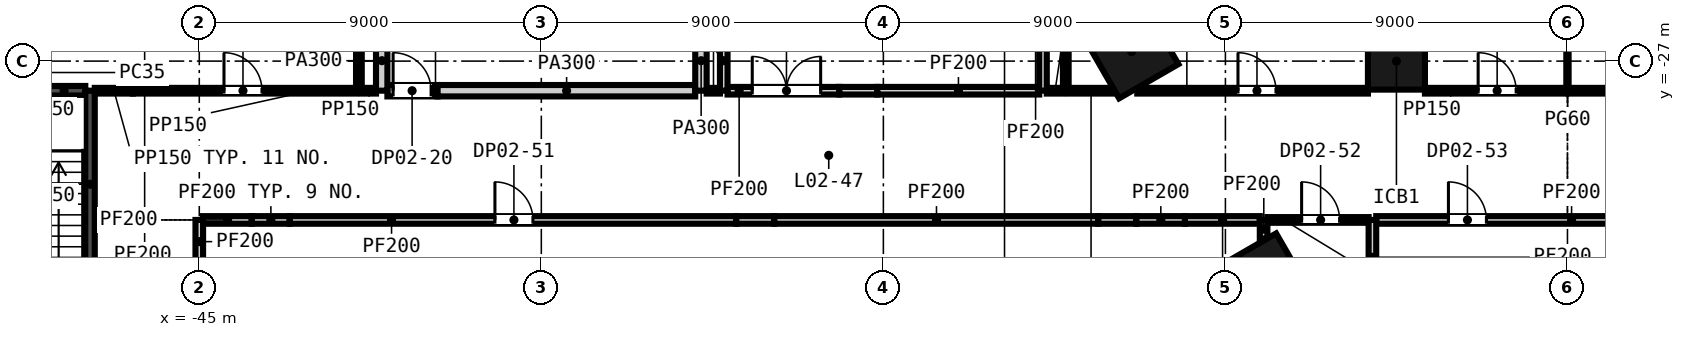
"""IFC4 building model, lengths in metres.
Left out: names, types, materials, properties, quantities, classifications, styles, units other than length and angle.
Written with IfcOpenShell. Run it as: python <this file> out.ifc"""

import sys

from ifc_helpers import new_model, si_unit, direction, frame, frame_2d, origin, origin_2d, place, context, subcontext, project, spatial, rectangle, extrude, element, fill, save


model = new_model("IFC4")
c1 = context("Model", 3, precision=1e-05, world=origin(), true_north=direction((0.0, 1.0)))
c2 = subcontext(c1, "Body", "Model", "MODEL_VIEW")
j1 = project(units=[si_unit("LENGTHUNIT", "METRE"), si_unit("PLANEANGLEUNIT", "RADIAN")], contexts=[c1])
p1 = place(None, origin())
s1 = spatial("IfcSite", under=j1, at=p1, CompositionType="ELEMENT")
p2 = place(p1, origin())
s2 = spatial("IfcBuilding", under=s1, at=p2, CompositionType="ELEMENT")
p3 = place(p2, frame((0.0, 0.0, 18.0)))
s3 = spatial("IfcBuildingStorey", under=s2, at=p3, CompositionType="ELEMENT", Elevation=18.0)
for number, where, z_axis, x_axis in (
    (1, (-20.467, -26.75, -0.4), (0.0, 0.0, 1.0), (0.5, -0.866, 0.0)),
    (2, (-16.995, -32.763, -0.4), (0.0, 0.0, 1.0), (0.5, -0.866, 0.0)),
):
    element("IfcColumn", number, at=place(p3, frame(where, z_axis=z_axis, x_axis=x_axis)), inside=s3, PredefinedType="COLUMN", context=c2, shape_type="SweptSolid", body=[
        extrude(rectangle(XDim=1.8, YDim=1.8, at=origin_2d()), origin(), (0.0, 0.0, 1.0), 4.6),
    ])
p4 = place(p3, frame((-13.5, -27.0, -0.4), z_axis=(0.0, 0.0, 1.0), x_axis=(1.0, 0.0, 0.0)))
e3 = element("IfcColumn", 3, at=p4, inside=s3, PredefinedType="COLUMN", context=c2, shape_type="SweptSolid", body=[
    extrude(rectangle(XDim=1.5, YDim=1.5, at=origin_2d()), origin(), (0.0, 0.0, 1.0), 4.6),
])
p5 = place(p3, frame((-44.9, -31.179, 0.0), z_axis=(0.0, 0.0, 1.0), x_axis=(1.0, 0.0, 0.0)))
e4 = element("IfcWall", 4, at=p5, inside=s3, PredefinedType="PARTITIONING", context=c2, shape_type="SweptSolid", body=[
    extrude(rectangle(XDim=1.279, YDim=0.2, at=frame_2d((0.64, 0.0))), origin(), (0.0, 0.0, 1.0), 4.2),
])
p6 = place(p3, frame((-43.621, -31.179, 0.0), z_axis=(0.0, 0.0, 1.0), x_axis=(1.0, 0.0, 0.0)))
e5 = element("IfcWall", 5, at=p6, inside=s3, PredefinedType="PARTITIONING", context=c2, shape_type="SweptSolid", body=[
    extrude(rectangle(XDim=1.0, YDim=0.2, at=frame_2d((0.5, 0.0))), origin(), (0.0, 0.0, 1.0), 3.219),
])
p7 = place(p3, frame((-42.621, -31.179, 0.0), z_axis=(0.0, 0.0, 1.0), x_axis=(1.0, 0.0, 0.0)))
e6 = element("IfcWall", 6, at=p7, inside=s3, PredefinedType="PARTITIONING", context=c2, shape_type="SweptSolid", body=[
    extrude(rectangle(XDim=11.75, YDim=0.2, at=frame_2d((5.875, 0.0))), origin(), (0.0, 0.0, 1.0), 4.2),
])
p8 = place(p7, frame((5.4, 0.0, 0.0)))
e7 = element("IfcOpeningElement", 7, at=p8, cuts=e6, PredefinedType="OPENING", context=c2, shape_type="SweptSolid", body=[
    extrude(rectangle(XDim=1.0, YDim=2.1, at=frame_2d((0.5, 1.05))), frame((0.0, 0.11, 0.0), z_axis=(0.0, -1.0, 0.0), x_axis=(1.0, 0.0, 0.0)), (0.0, 0.0, 1.0), 0.22),
])
p9 = place(p3, frame((-30.871, -31.179, 0.0), z_axis=(0.0, 0.0, 1.0), x_axis=(1.0, 0.0, 0.0)))
e8 = element("IfcWall", 8, at=p9, inside=s3, PredefinedType="PARTITIONING", context=c2, shape_type="SweptSolid", body=[
    extrude(rectangle(XDim=1.0, YDim=0.2, at=frame_2d((0.5, 0.0))), origin(), (0.0, 0.0, 1.0), 3.219),
])
p10 = place(p3, frame((-29.871, -31.179, 0.0), z_axis=(0.0, 0.0, 1.0), x_axis=(1.0, 0.0, 0.0)))
e9 = element("IfcWall", 9, at=p10, inside=s3, PredefinedType="PARTITIONING", context=c2, shape_type="SweptSolid", body=[
    extrude(rectangle(XDim=8.527, YDim=0.2, at=frame_2d((4.263, 0.0))), origin(), (0.0, 0.0, 1.0), 4.2),
])
p11 = place(p3, frame((-21.344, -31.179, 0.0), z_axis=(0.0, 0.0, 1.0), x_axis=(1.0, 0.0, 0.0)))
e10 = element("IfcWall", 10, at=p11, inside=s3, PredefinedType="PARTITIONING", context=c2, shape_type="SweptSolid", body=[
    extrude(rectangle(XDim=1.0, YDim=0.2, at=frame_2d((0.5, 0.0))), origin(), (0.0, 0.0, 1.0), 3.451),
])
p12 = place(p3, frame((-20.344, -31.179, 0.0), z_axis=(0.0, 0.0, 1.0), x_axis=(1.0, 0.0, 0.0)))
e11 = element("IfcWall", 11, at=p12, inside=s3, PredefinedType="PARTITIONING", context=c2, shape_type="SweptSolid", body=[
    extrude(rectangle(XDim=1.279, YDim=0.2, at=frame_2d((0.64, 0.0))), origin(), (0.0, 0.0, 1.0), 4.2),
])
p13 = place(p3, frame((-19.065, -31.179, 0.0), z_axis=(0.0, 0.0, 1.0), x_axis=(1.0, 0.0, 0.0)))
e12 = element("IfcWall", 12, at=p13, inside=s3, PredefinedType="PARTITIONING", context=c2, shape_type="SweptSolid", body=[
    extrude(rectangle(XDim=1.97, YDim=0.2, at=frame_2d((0.985, 0.0))), origin(), (0.0, 0.0, 1.0), 3.2),
])
p14 = place(p3, frame((-16.895, -31.179, 0.0), z_axis=(0.0, 0.0, 1.0), x_axis=(1.0, 0.0, 0.0)))
e13 = element("IfcWall", 13, at=p14, inside=s3, PredefinedType="PARTITIONING", context=c2, shape_type="SweptSolid", body=[
    extrude(rectangle(XDim=2.663, YDim=0.15, at=frame_2d((1.332, 0.0))), origin(), (0.0, 0.0, 1.0), 4.2),
])
p15 = place(p14, frame((0.9, 0.0, 0.0)))
e14 = element("IfcOpeningElement", 14, at=p15, cuts=e13, PredefinedType="OPENING", context=c2, shape_type="SweptSolid", body=[
    extrude(rectangle(XDim=1.0, YDim=2.1, at=frame_2d((0.5, 1.05))), frame((0.0, 0.085, 0.0), z_axis=(0.0, -1.0, 0.0), x_axis=(1.0, 0.0, 0.0)), (0.0, 0.0, 1.0), 0.17),
])
p16 = place(p3, frame((-14.032, -31.179, 0.0), z_axis=(0.0, 0.0, 1.0), x_axis=(1.0, 0.0, 0.0)))
e15 = element("IfcWall", 15, at=p16, inside=s3, PredefinedType="PARTITIONING", context=c2, shape_type="SweptSolid", body=[
    extrude(rectangle(XDim=7.321, YDim=0.2, at=frame_2d((3.661, 0.0))), origin(), (0.0, 0.0, 1.0), 4.2),
])
p17 = place(p16, frame((1.9, 0.0, 0.0)))
e16 = element("IfcOpeningElement", 16, at=p17, cuts=e15, PredefinedType="OPENING", context=c2, shape_type="SweptSolid", body=[
    extrude(rectangle(XDim=1.0, YDim=2.1, at=frame_2d((0.5, 1.05))), frame((0.0, 0.11, 0.0), z_axis=(0.0, -1.0, 0.0), x_axis=(1.0, 0.0, 0.0)), (0.0, 0.0, 1.0), 0.22),
])
p18 = place(p3, frame((-49.125, -27.779, 0.0), z_axis=(0.0, 0.0, 1.0), x_axis=(1.0, 0.0, 0.0)))
e17 = element("IfcWall", 17, at=p18, inside=s3, PredefinedType="SHEAR", context=c2, shape_type="SweptSolid", body=[
    extrude(rectangle(XDim=1.125, YDim=0.25, at=frame_2d((0.562, 0.0))), origin(), (0.0, 0.0, 1.0), 4.2),
])
p19 = place(p3, frame((-47.75, -27.779, 0.0), z_axis=(0.0, 0.0, 1.0), x_axis=(1.0, 0.0, 0.0)))
e18 = element("IfcWall", 18, at=p19, inside=s3, PredefinedType="PARTITIONING", context=c2, shape_type="SweptSolid", body=[
    extrude(rectangle(XDim=1.0, YDim=0.15, at=frame_2d((0.5, 0.0))), origin(), (0.0, 0.0, 1.0), 3.667),
])
p20 = place(p3, frame((-46.75, -27.779, 0.0), z_axis=(0.0, 0.0, 1.0), x_axis=(1.0, 0.0, 0.0)))
e19 = element("IfcWall", 19, at=p20, inside=s3, PredefinedType="PARTITIONING", context=c2, shape_type="SweptSolid", body=[
    extrude(rectangle(XDim=5.875, YDim=0.15, at=frame_2d((2.938, 0.0))), origin(), (0.0, 0.0, 1.0), 4.2),
])
p21 = place(p20, frame((2.4, 0.0, 0.0)))
e20 = element("IfcOpeningElement", 20, at=p21, cuts=e19, PredefinedType="OPENING", context=c2, shape_type="SweptSolid", body=[
    extrude(rectangle(XDim=1.0, YDim=2.1, at=frame_2d((0.5, 1.05))), frame((0.0, 0.085, 0.0), z_axis=(0.0, -1.0, 0.0), x_axis=(1.0, 0.0, 0.0)), (0.0, 0.0, 1.0), 0.17),
])
p22 = place(p3, frame((-40.725, -27.779, 0.0), z_axis=(0.0, 0.0, 1.0), x_axis=(1.0, 0.0, 0.0)))
e21 = element("IfcWall", 21, at=p22, inside=s3, PredefinedType="PARTITIONING", context=c2, shape_type="SweptSolid", body=[
    extrude(rectangle(XDim=0.375, YDim=0.15, at=frame_2d((0.188, 0.0))), origin(), (0.0, 0.0, 1.0), 4.2),
])
p23 = place(p3, frame((-40.05, -27.779, 0.0), z_axis=(0.0, 0.0, 1.0), x_axis=(1.0, 0.0, 0.0)))
e22 = element("IfcWall", 22, at=p23, inside=s3, PredefinedType="PARTITIONING", context=c2, shape_type="SweptSolid", body=[
    extrude(rectangle(XDim=1.321, YDim=0.3, at=frame_2d((0.66, 0.0))), origin(), (0.0, 0.0, 1.0), 3.219),
])
p24 = place(p23, frame((0.15, 0.0, 0.0)))
e23 = element("IfcOpeningElement", 23, at=p24, cuts=e22, PredefinedType="OPENING", context=c2, shape_type="SweptSolid", body=[
    extrude(rectangle(XDim=1.0, YDim=2.1, at=frame_2d((0.5, 1.05))), frame((0.0, 0.16, 0.0), z_axis=(0.0, -1.0, 0.0), x_axis=(1.0, 0.0, 0.0)), (0.0, 0.0, 1.0), 0.32),
])
p25 = place(p3, frame((-38.729, -27.779, 0.0), z_axis=(0.0, 0.0, 1.0), x_axis=(1.0, 0.0, 0.0)))
e24 = element("IfcWall", 24, at=p25, inside=s3, PredefinedType="PARTITIONING", context=c2, shape_type="SweptSolid", body=[
    extrude(rectangle(XDim=6.779, YDim=0.3, at=frame_2d((3.39, 0.0))), origin(), (0.0, 0.0, 1.0), 4.2),
])
p26 = place(p3, frame((-31.65, -27.779, 0.0), z_axis=(0.0, 0.0, 1.0), x_axis=(1.0, 0.0, 0.0)))
e25 = element("IfcWall", 25, at=p26, inside=s3, PredefinedType="PARTITIONING", context=c2, shape_type="SweptSolid", body=[
    extrude(rectangle(XDim=0.35, YDim=0.15, at=frame_2d((0.175, 0.0))), origin(), (0.0, 0.0, 1.0), 4.2),
])
p27 = place(p3, frame((-31.1, -27.779, 0.0), z_axis=(0.0, 0.0, 1.0), x_axis=(1.0, 0.0, 0.0)))
e26 = element("IfcWall", 26, at=p27, inside=s3, PredefinedType="PARTITIONING", context=c2, shape_type="SweptSolid", body=[
    extrude(rectangle(XDim=2.941, YDim=0.2, at=frame_2d((1.47, 0.0))), origin(), (0.0, 0.0, 1.0), 4.2),
])
p28 = place(p27, frame((0.65, 0.0, 0.0)))
e27 = element("IfcOpeningElement", 27, at=p28, cuts=e26, PredefinedType="OPENING", context=c2, shape_type="SweptSolid", body=[
    extrude(rectangle(XDim=1.8, YDim=2.4, at=frame_2d((0.9, 1.2))), frame((0.0, 0.11, 0.0), z_axis=(0.0, -1.0, 0.0), x_axis=(1.0, 0.0, 0.0)), (0.0, 0.0, 1.0), 0.22),
])
p29 = place(p3, frame((-28.159, -27.779, 0.0), z_axis=(0.0, 0.0, 1.0), x_axis=(1.0, 0.0, 0.0)))
e28 = element("IfcWall", 28, at=p29, inside=s3, PredefinedType="PARTITIONING", context=c2, shape_type="SweptSolid", body=[
    extrude(rectangle(XDim=1.0, YDim=0.2, at=frame_2d((0.5, 0.0))), origin(), (0.0, 0.0, 1.0), 3.219),
])
p30 = place(p3, frame((-27.159, -27.779, 0.0), z_axis=(0.0, 0.0, 1.0), x_axis=(1.0, 0.0, 0.0)))
e29 = element("IfcWall", 29, at=p30, inside=s3, PredefinedType="PARTITIONING", context=c2, shape_type="SweptSolid", body=[
    extrude(rectangle(XDim=4.259, YDim=0.2, at=frame_2d((2.13, 0.0))), origin(), (0.0, 0.0, 1.0), 4.2),
])
p31 = place(p3, frame((-22.7, -27.779, 0.0), z_axis=(0.0, 0.0, 1.0), x_axis=(1.0, 0.0, 0.0)))
e30 = element("IfcWall", 30, at=p31, inside=s3, PredefinedType="PARTITIONING", context=c2, shape_type="SweptSolid", body=[
    extrude(rectangle(XDim=0.425, YDim=0.15, at=frame_2d((0.212, 0.0))), origin(), (0.0, 0.0, 1.0), 4.2),
])
p32 = place(p3, frame((-22.125, -27.779, 0.0), z_axis=(0.0, 0.0, 1.0), x_axis=(1.0, 0.0, 0.0)))
e31 = element("IfcWall", 31, at=p32, inside=s3, PredefinedType="PARTITIONING", context=c2, shape_type="SweptSolid", body=[
    extrude(rectangle(XDim=1.169, YDim=0.15, at=frame_2d((0.585, 0.0))), origin(), (0.0, 0.0, 1.0), 4.2),
])
p33 = place(p3, frame((-20.319, -27.779, 0.0), z_axis=(0.0, 0.0, 1.0), x_axis=(1.0, 0.0, 0.0)))
e32 = element("IfcWall", 32, at=p33, inside=s3, PredefinedType="PARTITIONING", context=c2, shape_type="SweptSolid", body=[
    extrude(rectangle(XDim=6.069, YDim=0.15, at=frame_2d((3.035, 0.0))), origin(), (0.0, 0.0, 1.0), 4.2),
])
p34 = place(p33, frame((2.65, 0.0, 0.0)))
e33 = element("IfcOpeningElement", 33, at=p34, cuts=e32, PredefinedType="OPENING", context=c2, shape_type="SweptSolid", body=[
    extrude(rectangle(XDim=1.0, YDim=2.1, at=frame_2d((0.5, 1.05))), frame((0.0, 0.085, 0.0), z_axis=(0.0, -1.0, 0.0), x_axis=(1.0, 0.0, 0.0)), (0.0, 0.0, 1.0), 0.17),
])
p35 = place(p3, frame((-12.75, -27.779, 0.0), z_axis=(0.0, 0.0, 1.0), x_axis=(1.0, 0.0, 0.0)))
e34 = element("IfcWall", 34, at=p35, inside=s3, PredefinedType="PARTITIONING", context=c2, shape_type="SweptSolid", body=[
    extrude(rectangle(XDim=3.72, YDim=0.15, at=frame_2d((1.86, 0.0))), origin(), (0.0, 0.0, 1.0), 4.2),
])
p36 = place(p35, frame((1.4, 0.0, 0.0)))
e35 = element("IfcOpeningElement", 35, at=p36, cuts=e34, PredefinedType="OPENING", context=c2, shape_type="SweptSolid", body=[
    extrude(rectangle(XDim=1.0, YDim=2.1, at=frame_2d((0.5, 1.05))), frame((0.0, 0.085, 0.0), z_axis=(0.0, -1.0, 0.0), x_axis=(1.0, 0.0, 0.0)), (0.0, 0.0, 1.0), 0.17),
])
p37 = place(p3, frame((-8.97, -27.779, 0.0), z_axis=(0.0, 0.0, 1.0), x_axis=(1.0, 0.0, 0.0)))
e36 = element("IfcWall", 36, at=p37, inside=s3, PredefinedType="PARTITIONING", context=c2, shape_type="SweptSolid", body=[
    extrude(rectangle(XDim=8.22, YDim=0.15, at=frame_2d((4.11, 0.0))), origin(), (0.0, 0.0, 1.0), 4.2),
])
p38 = place(p3, frame((-47.875, -34.6, 0.0), z_axis=(0.0, 0.0, 1.0), x_axis=(0.0, 1.0, 0.0)))
e37 = element("IfcWall", 37, at=p38, inside=s3, PredefinedType="SHEAR", context=c2, shape_type="SweptSolid", body=[
    extrude(rectangle(XDim=6.821, YDim=0.25, at=frame_2d((3.411, 0.0))), origin(), (0.0, 0.0, 1.0), 4.2),
])
p39 = place(p38, frame((0.65, 0.0, 0.0)))
e38 = element("IfcOpeningElement", 38, at=p39, cuts=e37, PredefinedType="OPENING", context=c2, shape_type="SweptSolid", body=[
    extrude(rectangle(XDim=1.2, YDim=2.1, at=frame_2d((0.6, 1.05))), frame((0.0, 0.135, 0.0), z_axis=(0.0, -1.0, 0.0), x_axis=(1.0, 0.0, 0.0)), (0.0, 0.0, 1.0), 0.27),
])
p40 = place(p3, frame((-45.0, -32.321, 0.0), z_axis=(0.0, 0.0, 1.0), x_axis=(0.0, 1.0, 0.0)))
e39 = element("IfcWall", 39, at=p40, inside=s3, PredefinedType="PARTITIONING", context=c2, shape_type="SweptSolid", body=[
    extrude(rectangle(XDim=1.142, YDim=0.2, at=frame_2d((0.571, 0.0))), origin(), (0.0, 0.0, 1.0), 4.2),
])
p41 = place(p3, frame((-40.8, -27.778, 0.0), z_axis=(0.0, 0.0, 1.0), x_axis=(0.0, 1.0, 0.0)))
e40 = element("IfcWall", 40, at=p41, inside=s3, PredefinedType="PARTITIONING", context=c2, shape_type="SweptSolid", body=[
    extrude(rectangle(XDim=1.578, YDim=0.15, at=frame_2d((0.789, 0.0))), origin(), (0.0, 0.0, 1.0), 4.2),
])
for number, where, z_axis, x_axis in (
    (41, (-40.2, -27.778, 0.0), (0.0, 0.0, 1.0), (0.0, 1.0, 0.0)),
    (42, (-31.8, -27.778, 0.0), (0.0, 0.0, 1.0), (0.0, 1.0, 0.0)),
):
    element("IfcWall", number, at=place(p3, frame(where, z_axis=z_axis, x_axis=x_axis)), inside=s3, PredefinedType="PARTITIONING", context=c2, shape_type="SweptSolid", body=[
        extrude(rectangle(XDim=1.578, YDim=0.3, at=frame_2d((0.789, 0.0))), origin(), (0.0, 0.0, 1.0), 4.2),
    ])
for number, where, z_axis, x_axis in (
    (43, (-31.2, -27.778, 0.0), (0.0, 0.0, 1.0), (0.0, 1.0, 0.0)),
    (44, (-22.8, -27.778, 0.0), (0.0, 0.0, 1.0), (0.0, 1.0, 0.0)),
):
    element("IfcWall", number, at=place(p3, frame(where, z_axis=z_axis, x_axis=x_axis)), inside=s3, PredefinedType="PARTITIONING", context=c2, shape_type="SweptSolid", body=[
        extrude(rectangle(XDim=1.578, YDim=0.2, at=frame_2d((0.789, 0.0))), origin(), (0.0, 0.0, 1.0), 4.2),
    ])
p42 = place(p3, frame((-22.2, -27.778, 0.0), z_axis=(0.0, 0.0, 1.0), x_axis=(0.0, 1.0, 0.0)))
e45 = element("IfcWall", 45, at=p42, inside=s3, PredefinedType="PARTITIONING", context=c2, shape_type="SweptSolid", body=[
    extrude(rectangle(XDim=1.578, YDim=0.15, at=frame_2d((0.789, 0.0))), origin(), (0.0, 0.0, 1.0), 4.2),
])
p43 = place(p3, frame((-16.995, -31.666, 0.0), z_axis=(0.0, 0.0, 1.0), x_axis=(0.0, 1.0, 0.0)))
e46 = element("IfcWall", 46, at=p43, inside=s3, PredefinedType="PARTITIONING", context=c2, shape_type="SweptSolid", body=[
    extrude(rectangle(XDim=0.487, YDim=0.2, at=frame_2d((0.244, 0.0))), origin(), (0.0, 0.0, 1.0), 4.2),
])
p44 = place(p3, frame((-14.132, -33.142, 0.0), z_axis=(0.0, 0.0, 1.0), x_axis=(0.0, 1.0, 0.0)))
e47 = element("IfcWall", 47, at=p44, inside=s3, PredefinedType="PARTITIONING", context=c2, shape_type="SweptSolid", body=[
    extrude(rectangle(XDim=1.963, YDim=0.2, at=frame_2d((0.982, 0.0))), origin(), (0.0, 0.0, 1.0), 4.2),
])
p45 = place(p3, frame((-9.0, -27.778, 0.0), z_axis=(0.0, 0.0, 1.0), x_axis=(0.0, 1.0, 0.0)))
e48 = element("IfcWall", 48, at=p45, inside=s3, PredefinedType="PARTITIONING", context=c2, shape_type="SweptSolid", body=[
    extrude(rectangle(XDim=8.441, YDim=0.06, at=frame_2d((4.22, 0.0))), origin(), (0.0, 0.0, 1.0), 4.2),
])
p46 = place(p21, origin())
e49 = element("IfcDoor", 49, at=p46, inside=s3, OperationType="SINGLE_SWING_LEFT", PredefinedType="DOOR", context=c2, shape_type="SweptSolid", body=[
    extrude(rectangle(XDim=1.0, YDim=2.1, at=frame_2d((0.5, 1.05))), frame((0.0, 0.025, 0.0), z_axis=(0.0, -1.0, 0.0), x_axis=(1.0, 0.0, 0.0)), (0.0, 0.0, 1.0), 0.05),
])
fill(e20, e49)
p47 = place(p24, origin())
e50 = element("IfcDoor", 50, at=p47, inside=s3, OperationType="SINGLE_SWING_LEFT", PredefinedType="DOOR", context=c2, shape_type="SweptSolid", body=[
    extrude(rectangle(XDim=1.0, YDim=2.1, at=frame_2d((0.5, 1.05))), frame((0.0, 0.025, 0.0), z_axis=(0.0, -1.0, 0.0), x_axis=(1.0, 0.0, 0.0)), (0.0, 0.0, 1.0), 0.05),
])
fill(e23, e50)
p48 = place(p28, origin())
e51 = element("IfcDoor", 51, at=p48, inside=s3, OperationType="SINGLE_SWING_LEFT", PredefinedType="DOOR", context=c2, shape_type="SweptSolid", body=[
    extrude(rectangle(XDim=1.8, YDim=2.4, at=frame_2d((0.9, 1.2))), frame((0.0, 0.025, 0.0), z_axis=(0.0, -1.0, 0.0), x_axis=(1.0, 0.0, 0.0)), (0.0, 0.0, 1.0), 0.05),
])
fill(e27, e51)
p49 = place(p34, origin())
e52 = element("IfcDoor", 52, at=p49, inside=s3, OperationType="SINGLE_SWING_LEFT", PredefinedType="DOOR", context=c2, shape_type="SweptSolid", body=[
    extrude(rectangle(XDim=1.0, YDim=2.1, at=frame_2d((0.5, 1.05))), frame((0.0, 0.025, 0.0), z_axis=(0.0, -1.0, 0.0), x_axis=(1.0, 0.0, 0.0)), (0.0, 0.0, 1.0), 0.05),
])
fill(e33, e52)
p50 = place(p36, origin())
e53 = element("IfcDoor", 53, at=p50, inside=s3, OperationType="SINGLE_SWING_LEFT", PredefinedType="DOOR", context=c2, shape_type="SweptSolid", body=[
    extrude(rectangle(XDim=1.0, YDim=2.1, at=frame_2d((0.5, 1.05))), frame((0.0, 0.025, 0.0), z_axis=(0.0, -1.0, 0.0), x_axis=(1.0, 0.0, 0.0)), (0.0, 0.0, 1.0), 0.05),
])
fill(e35, e53)
p51 = place(p8, origin())
e54 = element("IfcDoor", 54, at=p51, inside=s3, OperationType="SINGLE_SWING_LEFT", PredefinedType="DOOR", context=c2, shape_type="SweptSolid", body=[
    extrude(rectangle(XDim=1.0, YDim=2.1, at=frame_2d((0.5, 1.05))), frame((0.0, 0.025, 0.0), z_axis=(0.0, -1.0, 0.0), x_axis=(1.0, 0.0, 0.0)), (0.0, 0.0, 1.0), 0.05),
])
fill(e7, e54)
p52 = place(p15, origin())
e55 = element("IfcDoor", 55, at=p52, inside=s3, OperationType="SINGLE_SWING_LEFT", PredefinedType="DOOR", context=c2, shape_type="SweptSolid", body=[
    extrude(rectangle(XDim=1.0, YDim=2.1, at=frame_2d((0.5, 1.05))), frame((0.0, 0.025, 0.0), z_axis=(0.0, -1.0, 0.0), x_axis=(1.0, 0.0, 0.0)), (0.0, 0.0, 1.0), 0.05),
])
fill(e14, e55)
p53 = place(p17, origin())
e56 = element("IfcDoor", 56, at=p53, inside=s3, OperationType="SINGLE_SWING_LEFT", PredefinedType="DOOR", context=c2, shape_type="SweptSolid", body=[
    extrude(rectangle(XDim=1.0, YDim=2.1, at=frame_2d((0.5, 1.05))), frame((0.0, 0.025, 0.0), z_axis=(0.0, -1.0, 0.0), x_axis=(1.0, 0.0, 0.0)), (0.0, 0.0, 1.0), 0.05),
])
fill(e16, e56)
save(model, sys.argv[1])
